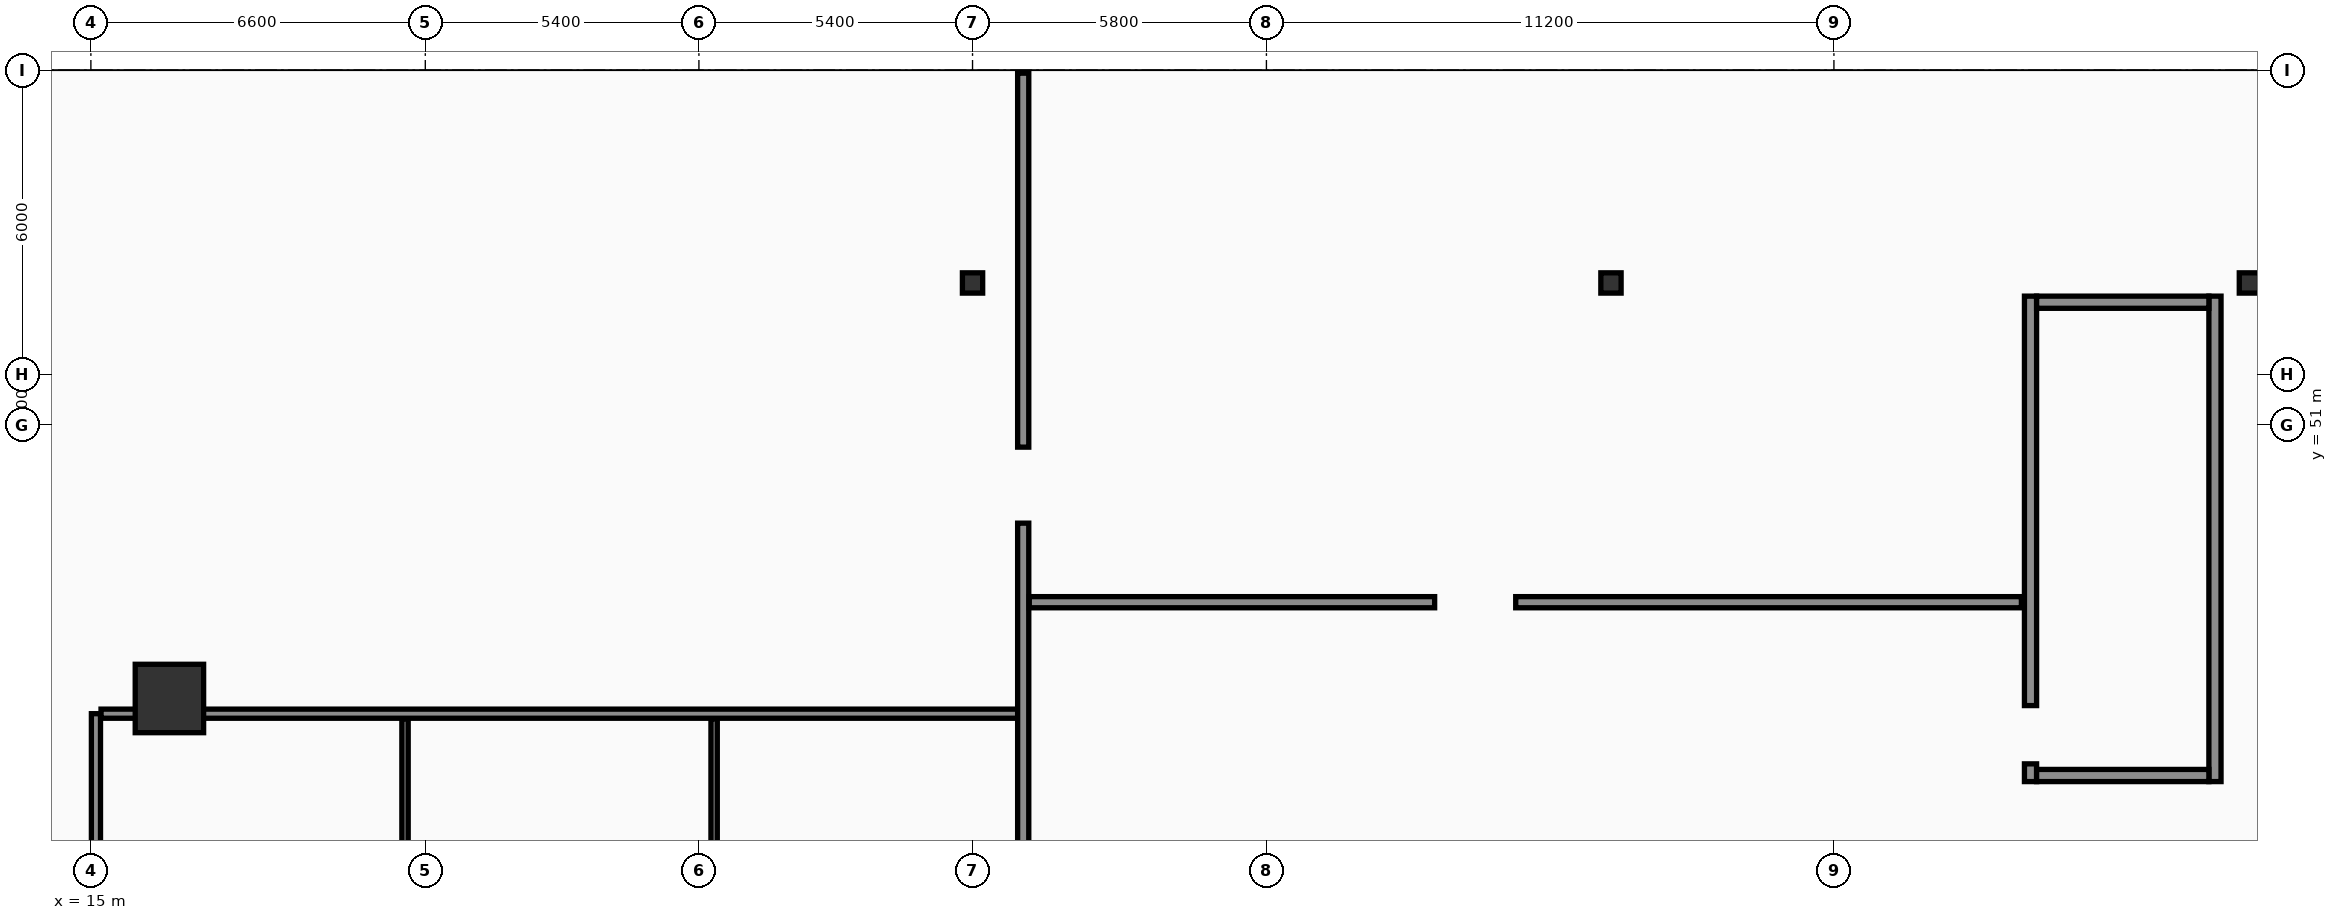
"""IFC4 building model, lengths in metres.
Left out: names, types, materials, properties, quantities, classifications, styles, units other than length and angle.
Written with IfcOpenShell. Run it as: python <this file> out.ifc"""

import sys

from ifc_helpers import new_model, si_unit, direction, frame, frame_2d, origin, origin_2d, place, context, subcontext, project, spatial, rectangle, i_section, extrude, element, fill, save


model = new_model("IFC4")
c1 = context("Model", 3, precision=1e-05, world=origin(), true_north=direction((0.0, 1.0)))
c2 = subcontext(c1, "Body", "Model", "MODEL_VIEW")
j1 = project(units=[si_unit("LENGTHUNIT", "METRE"), si_unit("PLANEANGLEUNIT", "RADIAN")], contexts=[c1])
p1 = place(None, origin())
s1 = spatial("IfcSite", under=j1, at=p1, CompositionType="ELEMENT")
p2 = place(p1, origin())
s2 = spatial("IfcBuilding", under=s1, at=p2, CompositionType="ELEMENT")
p3 = place(p2, frame((0.0, 0.0, 6.0)))
s3 = spatial("IfcBuildingStorey", under=s2, at=p3, CompositionType="ELEMENT", Elevation=6.0)
p4 = place(p3, frame((53.28, 43.96, 0.0), z_axis=(0.0, 0.0, 1.0), x_axis=(0.0, 1.0, 0.0)))
e1 = element("IfcWall", 1, at=p4, inside=s3, PredefinedType="SOLIDWALL", context=c2, shape_type="SweptSolid", body=[
    extrude(rectangle(XDim=9.58, YDim=0.24, at=frame_2d((4.79, 0.0))), origin(), (0.0, 0.0, 1.0), 5.68),
])
p5 = place(p4, frame((0.35, 0.0, 0.0)))
e2 = element("IfcOpeningElement", 2, at=p5, cuts=e1, PredefinedType="OPENING", context=c2, shape_type="SweptSolid", body=[
    extrude(rectangle(XDim=1.15, YDim=2.2, at=frame_2d((0.575, 1.1))), frame((0.0, 0.13, 0.0), z_axis=(0.0, -1.0, 0.0), x_axis=(1.0, 0.0, 0.0)), (0.0, 0.0, 1.0), 0.26),
])
p6 = place(p3, frame((56.92, 43.96, 0.0), z_axis=(0.0, 0.0, 1.0), x_axis=(0.0, 1.0, 0.0)))
e3 = element("IfcWall", 3, at=p6, inside=s3, PredefinedType="SOLIDWALL", context=c2, shape_type="SweptSolid", body=[
    extrude(rectangle(XDim=9.58, YDim=0.24, at=frame_2d((4.79, 0.0))), origin(), (0.0, 0.0, 1.0), 5.68),
])
for number, where, z_axis, x_axis in (
    (4, (53.4, 44.08, 0.0), (0.0, 0.0, 1.0), (1.0, 0.0, 0.0)),
    (5, (53.4, 53.42, 0.0), (0.0, 0.0, 1.0), (1.0, 0.0, 0.0)),
):
    element("IfcWall", number, at=place(p3, frame(where, z_axis=z_axis, x_axis=x_axis)), inside=s3, PredefinedType="SOLIDWALL", context=c2, shape_type="SweptSolid", body=[
        extrude(rectangle(XDim=3.4, YDim=0.24, at=frame_2d((1.7, 0.0))), origin(), (0.0, 0.0, 1.0), 5.68),
    ])
p7 = place(p3, frame((16.55, 45.6, 0.0), z_axis=(0.0, 0.0, 1.0), x_axis=(1.0, 0.0, 0.0)))
e6 = element("IfcColumn", 6, at=p7, inside=s3, PredefinedType="COLUMN", context=c2, shape_type="SweptSolid", body=[
    extrude(rectangle(XDim=1.35, YDim=1.35, at=origin_2d()), origin(), (0.0, 0.0, 1.0), 5.68),
])
for number, where, z_axis, x_axis in (
    (7, (32.4, 53.8, 0.0), (0.0, 0.0, 1.0), (1.0, 0.0, 0.0)),
    (8, (45.0, 53.8, 0.0), (0.0, 0.0, 1.0), (1.0, 0.0, 0.0)),
    (9, (57.6, 53.8, 0.0), (0.0, 0.0, 1.0), (1.0, 0.0, 0.0)),
):
    element("IfcColumn", number, at=place(p3, frame(where, z_axis=z_axis, x_axis=x_axis)), inside=s3, PredefinedType="PILASTER", context=c2, shape_type="SweptSolid", body=[
        extrude(i_section(OverallWidth=0.4, OverallDepth=0.4, WebThickness=0.013, FlangeThickness=0.021, FilletRadius=0.022, at=origin_2d()), origin(), (0.0, 0.0, 1.0), 5.68),
    ])
p8 = place(p3, frame((15.2, 45.3, 0.0), z_axis=(0.0, 0.0, 1.0), x_axis=(1.0, 0.0, 0.0)))
e10 = element("IfcWall", 10, at=p8, inside=s3, PredefinedType="PARTITIONING", context=c2, shape_type="SweptSolid", body=[
    extrude(rectangle(XDim=18.1, YDim=0.18, at=frame_2d((9.05, 0.0))), origin(), (0.0, 0.0, 1.0), 4.88),
])
p9 = place(p3, frame((15.1, 38.9, 0.0), z_axis=(0.0, 0.0, 1.0), x_axis=(0.0, 1.0, 0.0)))
e11 = element("IfcWall", 11, at=p9, inside=s3, PredefinedType="PARTITIONING", context=c2, shape_type="SweptSolid", body=[
    extrude(rectangle(XDim=6.4, YDim=0.18, at=frame_2d((3.2, 0.0))), origin(), (0.0, 0.0, 1.0), 4.88),
])
p10 = place(p3, frame((21.2, 39.0, 0.0), z_axis=(0.0, 0.0, 1.0), x_axis=(0.0, 1.0, 0.0)))
e12 = element("IfcWall", 12, at=p10, inside=s3, PredefinedType="PARTITIONING", context=c2, shape_type="SweptSolid", body=[
    extrude(rectangle(XDim=6.2, YDim=0.125, at=frame_2d((3.1, 0.0))), origin(), (0.0, 0.0, 1.0), 4.88),
])
p11 = place(p3, frame((27.3, 39.0, 0.0), z_axis=(0.0, 0.0, 1.0), x_axis=(0.0, 1.0, 0.0)))
e13 = element("IfcWall", 13, at=p11, inside=s3, PredefinedType="PARTITIONING", context=c2, shape_type="SweptSolid", body=[
    extrude(rectangle(XDim=6.2, YDim=0.125, at=frame_2d((3.1, 0.0))), origin(), (0.0, 0.0, 1.0), 5.68),
])
p12 = place(p3, frame((33.4, 0.06, 0.0), z_axis=(0.0, 0.0, 1.0), x_axis=(0.0, 1.0, 0.0)))
e14 = element("IfcWall", 14, at=p12, inside=s3, PredefinedType="SOLIDWALL", context=c2, shape_type="SweptSolid", body=[
    extrude(rectangle(XDim=57.88, YDim=0.22, at=frame_2d((28.94, 0.0))), origin(), (0.0, 0.0, 1.0), 4.88),
])
p13 = place(p12, frame((18.0, 0.0, 0.0)))
e15 = element("IfcOpeningElement", 15, at=p13, cuts=e14, PredefinedType="OPENING", context=c2, shape_type="SweptSolid", body=[
    extrude(rectangle(XDim=1.8, YDim=2.4, at=frame_2d((0.9, 1.2))), frame((0.0, 0.12, 0.0), z_axis=(0.0, -1.0, 0.0), x_axis=(1.0, 0.0, 0.0)), (0.0, 0.0, 1.0), 0.24),
])
p14 = place(p12, frame((29.0, 0.0, 0.0)))
e16 = element("IfcOpeningElement", 16, at=p14, cuts=e14, PredefinedType="OPENING", context=c2, shape_type="SweptSolid", body=[
    extrude(rectangle(XDim=1.6, YDim=2.35, at=frame_2d((0.8, 1.175))), frame((0.0, 0.12, 0.0), z_axis=(0.0, -1.0, 0.0), x_axis=(1.0, 0.0, 0.0)), (0.0, 0.0, 1.0), 0.24),
])
p15 = place(p12, frame((49.0, 0.0, 0.0)))
e17 = element("IfcOpeningElement", 17, at=p15, cuts=e14, PredefinedType="OPENING", context=c2, shape_type="SweptSolid", body=[
    extrude(rectangle(XDim=1.5, YDim=2.22, at=frame_2d((0.75, 1.11))), frame((0.0, 0.12, 0.0), z_axis=(0.0, -1.0, 0.0), x_axis=(1.0, 0.0, 0.0)), (0.0, 0.0, 1.0), 0.24),
])
p16 = place(p3, frame((33.52, 47.5, 0.0), z_axis=(0.0, 0.0, 1.0), x_axis=(1.0, 0.0, 0.0)))
e18 = element("IfcWall", 18, at=p16, inside=s3, PredefinedType="SOLIDWALL", context=c2, shape_type="SweptSolid", body=[
    extrude(rectangle(XDim=19.58, YDim=0.22, at=frame_2d((9.79, 0.0))), origin(), (0.0, 0.0, 1.0), 4.88),
])
p17 = place(p16, frame((8.0, 0.0, 0.0)))
e19 = element("IfcOpeningElement", 19, at=p17, cuts=e18, PredefinedType="OPENING", context=c2, shape_type="SweptSolid", body=[
    extrude(rectangle(XDim=1.6, YDim=2.35, at=frame_2d((0.8, 1.175))), frame((0.0, 0.12, 0.0), z_axis=(0.0, -1.0, 0.0), x_axis=(1.0, 0.0, 0.0)), (0.0, 0.0, 1.0), 0.24),
])
p18 = place(p15, origin())
e20 = element("IfcDoor", 20, at=p18, inside=s3, OperationType="SINGLE_SWING_LEFT", PredefinedType="DOOR", context=c2, shape_type="SweptSolid", body=[
    extrude(rectangle(XDim=1.5, YDim=2.22, at=frame_2d((0.75, 1.11))), frame((0.0, 0.025, 0.0), z_axis=(0.0, -1.0, 0.0), x_axis=(1.0, 0.0, 0.0)), (0.0, 0.0, 1.0), 0.05),
])
fill(e17, e20)
p19 = place(p17, origin())
e21 = element("IfcDoor", 21, at=p19, inside=s3, OperationType="SINGLE_SWING_LEFT", PredefinedType="DOOR", context=c2, shape_type="SweptSolid", body=[
    extrude(rectangle(XDim=1.6, YDim=2.35, at=frame_2d((0.8, 1.175))), frame((0.0, 0.025, 0.0), z_axis=(0.0, -1.0, 0.0), x_axis=(1.0, 0.0, 0.0)), (0.0, 0.0, 1.0), 0.05),
])
fill(e19, e21)
p20 = place(p5, origin())
e22 = element("IfcDoor", 22, at=p20, inside=s3, OperationType="SINGLE_SWING_LEFT", PredefinedType="DOOR", context=c2, shape_type="SweptSolid", body=[
    extrude(rectangle(XDim=1.15, YDim=2.2, at=frame_2d((0.575, 1.1))), frame((0.0, 0.025, 0.0), z_axis=(0.0, -1.0, 0.0), x_axis=(1.0, 0.0, 0.0)), (0.0, 0.0, 1.0), 0.05),
])
fill(e2, e22)
save(model, sys.argv[1])
